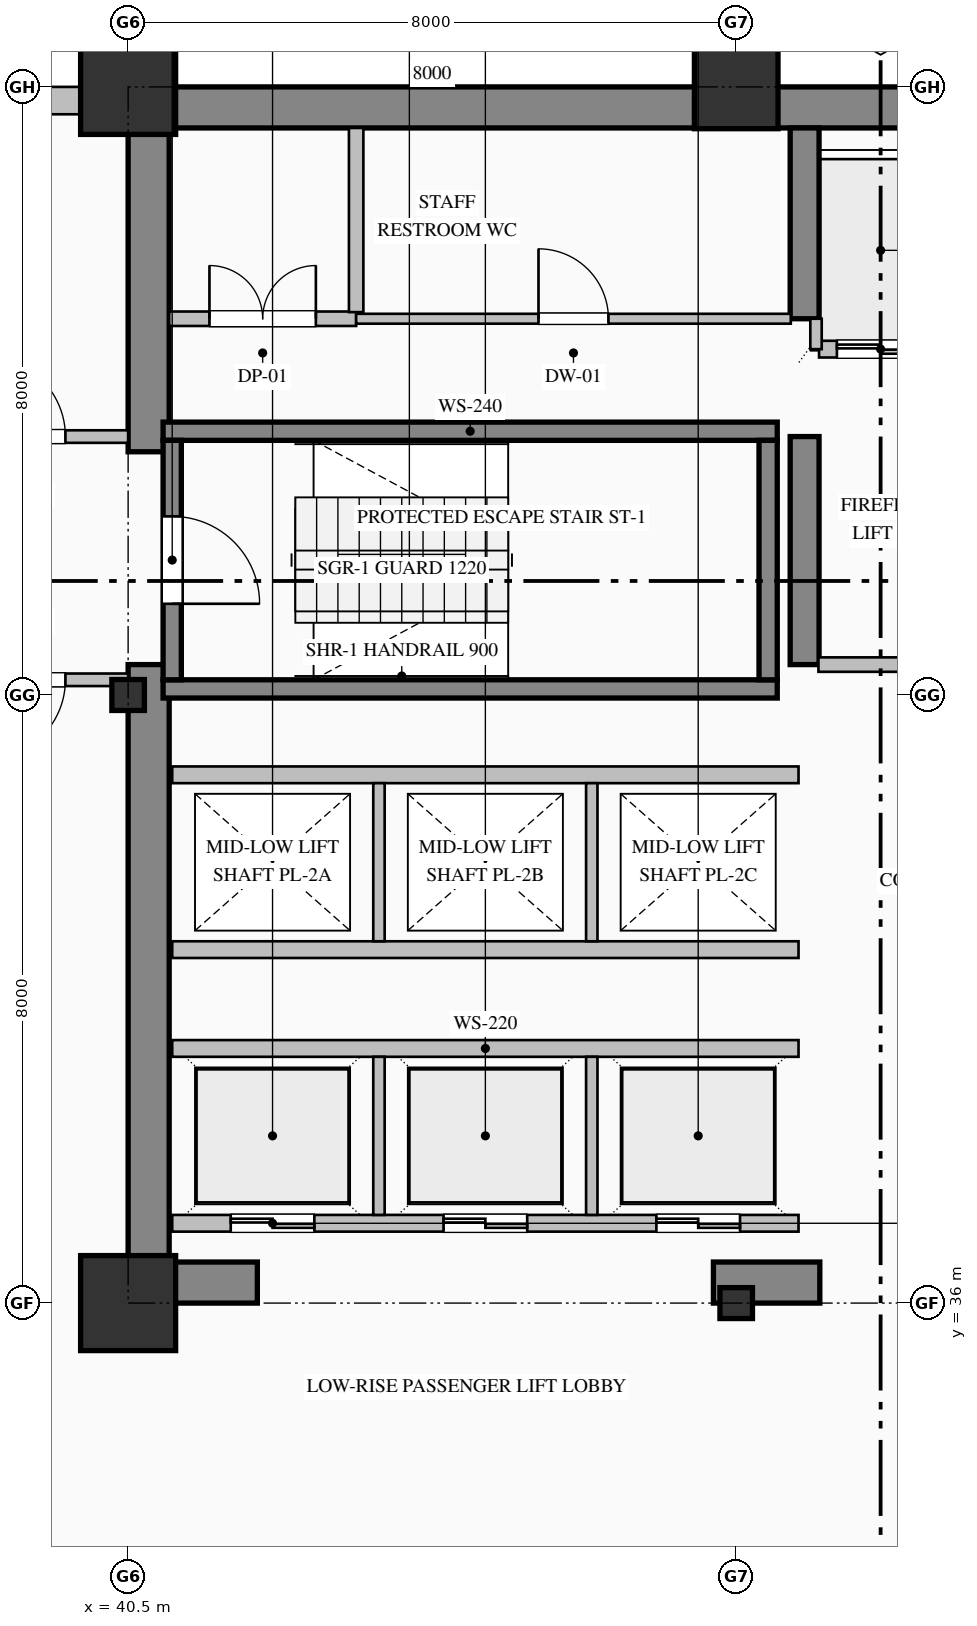
"""IFC4 building model, lengths in metres.
Left out: names, types, materials, properties, quantities, classifications, styles, units other than length and angle.
Written with IfcOpenShell. Run it as: python <this file> out.ifc"""

import sys

from ifc_helpers import new_model, si_unit, direction, frame, frame_2d, origin, origin_2d, place, context, subcontext, project, spatial, rectangle, hollow_rectangle, i_section, extrude, element, fill, save


model = new_model("IFC4")
c1 = context("Model", 3, precision=1e-05, world=origin(), true_north=direction((0.0, 1.0)))
c2 = subcontext(c1, "Body", "Model", "MODEL_VIEW")
j1 = project(units=[si_unit("LENGTHUNIT", "METRE"), si_unit("PLANEANGLEUNIT", "RADIAN")], contexts=[c1])
p1 = place(None, origin())
s1 = spatial("IfcSite", under=j1, at=p1, CompositionType="ELEMENT")
p2 = place(p1, origin())
s2 = spatial("IfcBuilding", under=s1, at=p2, CompositionType="ELEMENT")
p3 = place(p2, frame((0.0, 0.0, 80.2)))
s3 = spatial("IfcBuildingStorey", under=s2, at=p3, CompositionType="ELEMENT", Elevation=80.2)
p4 = place(p3, frame((40.5, 51.73, 0.0), z_axis=(0.0, 0.0, 1.0), x_axis=(1.0, 0.0, 0.0)))
e1 = element("IfcWall", 1, at=p4, inside=s3, PredefinedType="SHEAR", context=c2, shape_type="SweptSolid", body=[
    extrude(rectangle(XDim=23.5, YDim=0.54, at=frame_2d((11.75, 0.0))), origin(), (0.0, 0.0, 1.0), 3.75),
])
p5 = place(p3, frame((40.77, 36.54, 0.0), z_axis=(0.0, 0.0, 1.0), x_axis=(0.0, 1.0, 0.0)))
e2 = element("IfcWall", 2, at=p5, inside=s3, PredefinedType="SHEAR", context=c2, shape_type="SweptSolid", body=[
    extrude(rectangle(XDim=7.86, YDim=0.54, at=frame_2d((3.93, 0.0))), origin(), (0.0, 0.0, 1.0), 3.75),
])
p6 = place(p3, frame((40.77, 47.2, 0.0), z_axis=(0.0, 0.0, 1.0), x_axis=(0.0, 1.0, 0.0)))
e3 = element("IfcWall", 3, at=p6, inside=s3, PredefinedType="SHEAR", context=c2, shape_type="SweptSolid", body=[
    extrude(rectangle(XDim=4.26, YDim=0.54, at=frame_2d((2.13, 0.0))), origin(), (0.0, 0.0, 1.0), 3.75),
])
p7 = place(p3, frame((40.5, 36.27, 0.0), z_axis=(0.0, 0.0, 1.0), x_axis=(1.0, 0.0, 0.0)))
e4 = element("IfcWall", 4, at=p7, inside=s3, PredefinedType="SHEAR", context=c2, shape_type="SweptSolid", body=[
    extrude(rectangle(XDim=1.7, YDim=0.54, at=frame_2d((0.85, 0.0))), origin(), (0.0, 0.0, 1.0), 3.75),
])
p8 = place(p3, frame((48.2, 36.27, 0.0), z_axis=(0.0, 0.0, 1.0), x_axis=(1.0, 0.0, 0.0)))
e5 = element("IfcWall", 5, at=p8, inside=s3, PredefinedType="SHEAR", context=c2, shape_type="SweptSolid", body=[
    extrude(rectangle(XDim=1.4, YDim=0.54, at=frame_2d((0.7, 0.0))), origin(), (0.0, 0.0, 1.0), 3.75),
])
p9 = place(p3, frame((49.4, 44.4, 0.0), z_axis=(0.0, 0.0, 1.0), x_axis=(0.0, 1.0, 0.0)))
e6 = element("IfcWall", 6, at=p9, inside=s3, PredefinedType="SHEAR", context=c2, shape_type="SweptSolid", body=[
    extrude(rectangle(XDim=3.0, YDim=0.38, at=frame_2d((1.5, 0.0))), origin(), (0.0, 0.0, 1.0), 3.75),
])
p10 = place(p3, frame((49.4, 48.95, 0.0), z_axis=(0.0, 0.0, 1.0), x_axis=(0.0, 1.0, 0.0)))
e7 = element("IfcWall", 7, at=p10, inside=s3, PredefinedType="SHEAR", context=c2, shape_type="SweptSolid", body=[
    extrude(rectangle(XDim=2.51, YDim=0.38, at=frame_2d((1.255, 0.0))), origin(), (0.0, 0.0, 1.0), 3.75),
])
p11 = place(p3, frame((40.5, 36.0, 0.0), z_axis=(0.0, 0.0, 1.0), x_axis=(1.0, 0.0, 0.0)))
e8 = element("IfcColumn", 8, at=p11, inside=s3, PredefinedType="COLUMN", context=c2, shape_type="SweptSolid", body=[
    extrude(hollow_rectangle(XDim=1.25, YDim=1.25, WallThickness=0.045, at=origin_2d()), origin(), (0.0, 0.0, 1.0), 4.0),
])
p12 = place(p3, frame((40.5, 44.0, 0.0), z_axis=(0.0, 0.0, 1.0), x_axis=(1.0, 0.0, 0.0)))
e9 = element("IfcColumn", 9, at=p12, inside=s3, PredefinedType="COLUMN", context=c2, shape_type="SweptSolid", body=[
    extrude(i_section(OverallWidth=0.407, OverallDepth=0.428, WebThickness=0.02, FlangeThickness=0.035, FilletRadius=0.022, at=origin_2d()), origin(), (0.0, 0.0, 1.0), 4.0),
])
p13 = place(p3, frame((40.5, 52.0, 0.0), z_axis=(0.0, 0.0, 1.0), x_axis=(1.0, 0.0, 0.0)))
e10 = element("IfcColumn", 10, at=p13, inside=s3, PredefinedType="COLUMN", context=c2, shape_type="SweptSolid", body=[
    extrude(hollow_rectangle(XDim=1.25, YDim=1.25, WallThickness=0.045, at=origin_2d()), origin(), (0.0, 0.0, 1.0), 4.0),
])
p14 = place(p3, frame((48.5, 36.0, 0.0), z_axis=(0.0, 0.0, 1.0), x_axis=(1.0, 0.0, 0.0)))
e11 = element("IfcColumn", 11, at=p14, inside=s3, PredefinedType="COLUMN", context=c2, shape_type="SweptSolid", body=[
    extrude(i_section(OverallWidth=0.407, OverallDepth=0.428, WebThickness=0.02, FlangeThickness=0.035, FilletRadius=0.022, at=origin_2d()), origin(), (0.0, 0.0, 1.0), 4.0),
])
p15 = place(p3, frame((48.5, 52.0, 0.0), z_axis=(0.0, 0.0, 1.0), x_axis=(1.0, 0.0, 0.0)))
e12 = element("IfcColumn", 12, at=p15, inside=s3, PredefinedType="COLUMN", context=c2, shape_type="SweptSolid", body=[
    extrude(hollow_rectangle(XDim=1.1, YDim=1.1, WallThickness=0.04, at=origin_2d()), origin(), (0.0, 0.0, 1.0), 4.0),
])
p16 = place(p3, frame((4.0, 51.82, 0.0), z_axis=(0.0, 0.0, 1.0), x_axis=(1.0, 0.0, 0.0)))
e13 = element("IfcWall", 13, at=p16, inside=s3, PredefinedType="SOLIDWALL", context=c2, shape_type="SweptSolid", body=[
    extrude(rectangle(XDim=36.52, YDim=0.36, at=frame_2d((18.26, 0.0))), origin(), (0.0, 0.0, 1.0), 3.25),
])
p17 = place(p16, frame((6.15, 0.0, 0.85)))
e14 = element("IfcOpeningElement", 14, at=p17, cuts=e13, PredefinedType="OPENING", context=c2, shape_type="SweptSolid", body=[
    extrude(rectangle(XDim=2.1, YDim=2.05, at=frame_2d((1.05, 1.025))), frame((0.0, 0.19, 0.0), z_axis=(0.0, -1.0, 0.0), x_axis=(1.0, 0.0, 0.0)), (0.0, 0.0, 1.0), 0.38),
])
p18 = place(p16, frame((13.5, 0.0, 0.85)))
e15 = element("IfcOpeningElement", 15, at=p18, cuts=e13, PredefinedType="OPENING", context=c2, shape_type="SweptSolid", body=[
    extrude(rectangle(XDim=1.8, YDim=2.05, at=frame_2d((0.9, 1.025))), frame((0.0, 0.19, 0.0), z_axis=(0.0, -1.0, 0.0), x_axis=(1.0, 0.0, 0.0)), (0.0, 0.0, 1.0), 0.38),
])
p19 = place(p16, frame((16.95, 0.0, 0.85)))
e16 = element("IfcOpeningElement", 16, at=p19, cuts=e13, PredefinedType="OPENING", context=c2, shape_type="SweptSolid", body=[
    extrude(rectangle(XDim=2.1, YDim=2.05, at=frame_2d((1.05, 1.025))), frame((0.0, 0.19, 0.0), z_axis=(0.0, -1.0, 0.0), x_axis=(1.0, 0.0, 0.0)), (0.0, 0.0, 1.0), 0.38),
])
p20 = place(p16, frame((24.3, 0.0, 0.85)))
e17 = element("IfcOpeningElement", 17, at=p20, cuts=e13, PredefinedType="OPENING", context=c2, shape_type="SweptSolid", body=[
    extrude(rectangle(XDim=1.8, YDim=2.05, at=frame_2d((0.9, 1.025))), frame((0.0, 0.19, 0.0), z_axis=(0.0, -1.0, 0.0), x_axis=(1.0, 0.0, 0.0)), (0.0, 0.0, 1.0), 0.38),
])
for number, where, z_axis, x_axis in (
    (18, (40.96, 47.47, 0.0), (0.0, 0.0, 1.0), (1.0, 0.0, 0.0)),
    (19, (49.04, 44.08, 0.0), (0.0, 0.0, 1.0), (-1.0, 0.0, 0.0)),
):
    element("IfcWall", number, at=place(p3, frame(where, z_axis=z_axis, x_axis=x_axis)), inside=s3, PredefinedType="SOLIDWALL", context=c2, shape_type="SweptSolid", body=[
        extrude(rectangle(XDim=8.08, YDim=0.24, at=frame_2d((4.04, 0.0))), origin(), (0.0, 0.0, 1.0), 4.0),
    ])
p21 = place(p3, frame((41.08, 47.35, 0.0), z_axis=(0.0, 0.0, 1.0), x_axis=(0.0, -1.0, 0.0)))
e20 = element("IfcWall", 20, at=p21, inside=s3, PredefinedType="SOLIDWALL", context=c2, shape_type="SweptSolid", body=[
    extrude(rectangle(XDim=3.15, YDim=0.24, at=frame_2d((1.575, 0.0))), origin(), (0.0, 0.0, 1.0), 4.0),
])
p22 = place(p21, frame((1.0, 0.0, 0.0)))
e21 = element("IfcOpeningElement", 21, at=p22, cuts=e20, PredefinedType="OPENING", context=c2, shape_type="SweptSolid", body=[
    extrude(rectangle(XDim=1.15, YDim=2.2, at=frame_2d((0.575, 1.1))), frame((0.0, 0.13, 0.0), z_axis=(0.0, -1.0, 0.0), x_axis=(1.0, 0.0, 0.0)), (0.0, 0.0, 1.0), 0.26),
])
p23 = place(p3, frame((48.92, 44.2, 0.0), z_axis=(0.0, 0.0, 1.0), x_axis=(0.0, 1.0, 0.0)))
e22 = element("IfcWall", 22, at=p23, inside=s3, PredefinedType="SOLIDWALL", context=c2, shape_type="SweptSolid", body=[
    extrude(rectangle(XDim=3.15, YDim=0.24, at=frame_2d((1.575, 0.0))), origin(), (0.0, 0.0, 1.0), 4.0),
])
p24 = place(p3, frame((54.71, 48.55, 0.0), z_axis=(0.0, 0.0, 1.0), x_axis=(-1.0, 0.0, 0.0)))
e23 = element("IfcWall", 23, at=p24, inside=s3, PredefinedType="PARTITIONING", context=c2, shape_type="SweptSolid", body=[
    extrude(rectangle(XDim=5.12, YDim=0.22, at=frame_2d((2.56, 0.0))), origin(), (0.0, 0.0, 1.0), 3.75),
])
p25 = place(p24, frame((3.735, 0.0, 0.0)))
e24 = element("IfcOpeningElement", 24, at=p25, cuts=e23, PredefinedType="OPENING", context=c2, shape_type="SweptSolid", body=[
    extrude(rectangle(XDim=1.15, YDim=2.2, at=frame_2d((0.575, 1.1))), frame((0.0, 0.12, 0.0), z_axis=(0.0, -1.0, 0.0), x_axis=(1.0, 0.0, 0.0)), (0.0, 0.0, 1.0), 0.24),
])
p26 = place(p24, frame((0.935, 0.0, 0.0)))
e25 = element("IfcOpeningElement", 25, at=p26, cuts=e23, PredefinedType="OPENING", context=c2, shape_type="SweptSolid", body=[
    extrude(rectangle(XDim=1.15, YDim=2.2, at=frame_2d((0.575, 1.1))), frame((0.0, 0.12, 0.0), z_axis=(0.0, -1.0, 0.0), x_axis=(1.0, 0.0, 0.0)), (0.0, 0.0, 1.0), 0.24),
])
p27 = place(p3, frame((49.55, 48.55, 0.0), z_axis=(0.0, 0.0, 1.0), x_axis=(0.0, 1.0, 0.0)))
e26 = element("IfcWall", 26, at=p27, inside=s3, PredefinedType="PARTITIONING", context=c2, shape_type="SweptSolid", body=[
    extrude(rectangle(XDim=0.4, YDim=0.15, at=frame_2d((0.2, 0.0))), origin(), (0.0, 0.0, 1.0), 3.75),
])
p28 = place(p3, frame((49.32, 37.05, 0.0), z_axis=(0.0, 0.0, 1.0), x_axis=(-1.0, 0.0, 0.0)))
e27 = element("IfcWall", 27, at=p28, inside=s3, PredefinedType="PARTITIONING", context=c2, shape_type="SweptSolid", body=[
    extrude(rectangle(XDim=8.24, YDim=0.22, at=frame_2d((4.12, 0.0))), origin(), (0.0, 0.0, 1.0), 3.75),
])
p29 = place(p28, frame((6.37, 0.0, 0.0)))
e28 = element("IfcOpeningElement", 28, at=p29, cuts=e27, PredefinedType="OPENING", context=c2, shape_type="SweptSolid", body=[
    extrude(rectangle(XDim=1.1, YDim=2.2, at=frame_2d((0.55, 1.1))), frame((0.0, 0.12, 0.0), z_axis=(0.0, -1.0, 0.0), x_axis=(1.0, 0.0, 0.0)), (0.0, 0.0, 1.0), 0.24),
])
p30 = place(p28, frame((3.57, 0.0, 0.0)))
e29 = element("IfcOpeningElement", 29, at=p30, cuts=e27, PredefinedType="OPENING", context=c2, shape_type="SweptSolid", body=[
    extrude(rectangle(XDim=1.1, YDim=2.2, at=frame_2d((0.55, 1.1))), frame((0.0, 0.12, 0.0), z_axis=(0.0, -1.0, 0.0), x_axis=(1.0, 0.0, 0.0)), (0.0, 0.0, 1.0), 0.24),
])
p31 = place(p28, frame((0.77, 0.0, 0.0)))
e30 = element("IfcOpeningElement", 30, at=p31, cuts=e27, PredefinedType="OPENING", context=c2, shape_type="SweptSolid", body=[
    extrude(rectangle(XDim=1.1, YDim=2.2, at=frame_2d((0.55, 1.1))), frame((0.0, 0.12, 0.0), z_axis=(0.0, -1.0, 0.0), x_axis=(1.0, 0.0, 0.0)), (0.0, 0.0, 1.0), 0.24),
])
p32 = place(p3, frame((41.08, 39.35, 0.0), z_axis=(0.0, 0.0, 1.0), x_axis=(1.0, 0.0, 0.0)))
e31 = element("IfcWall", 31, at=p32, inside=s3, PredefinedType="PARTITIONING", context=c2, shape_type="SweptSolid", body=[
    extrude(rectangle(XDim=8.24, YDim=0.22, at=frame_2d((4.12, 0.0))), origin(), (0.0, 0.0, 1.0), 3.75),
])
for number, where, z_axis, x_axis in (
    (32, (43.8, 37.16, 0.0), (0.0, 0.0, 1.0), (0.0, 1.0, 0.0)),
    (33, (46.6, 37.16, 0.0), (0.0, 0.0, 1.0), (0.0, 1.0, 0.0)),
):
    element("IfcWall", number, at=place(p3, frame(where, z_axis=z_axis, x_axis=x_axis)), inside=s3, PredefinedType="PARTITIONING", context=c2, shape_type="SweptSolid", body=[
        extrude(rectangle(XDim=2.08, YDim=0.15, at=frame_2d((1.04, 0.0))), origin(), (0.0, 0.0, 1.0), 3.75),
    ])
for number, where, z_axis, x_axis in (
    (34, (49.32, 40.65, 0.0), (0.0, 0.0, 1.0), (-1.0, 0.0, 0.0)),
    (35, (41.08, 42.95, 0.0), (0.0, 0.0, 1.0), (1.0, 0.0, 0.0)),
):
    element("IfcWall", number, at=place(p3, frame(where, z_axis=z_axis, x_axis=x_axis)), inside=s3, PredefinedType="PARTITIONING", context=c2, shape_type="SweptSolid", body=[
        extrude(rectangle(XDim=8.24, YDim=0.22, at=frame_2d((4.12, 0.0))), origin(), (0.0, 0.0, 1.0), 3.75),
    ])
for number, where, z_axis, x_axis in (
    (36, (43.8, 40.76, 0.0), (0.0, 0.0, 1.0), (0.0, 1.0, 0.0)),
    (37, (46.6, 40.76, 0.0), (0.0, 0.0, 1.0), (0.0, 1.0, 0.0)),
):
    element("IfcWall", number, at=place(p3, frame(where, z_axis=z_axis, x_axis=x_axis)), inside=s3, PredefinedType="PARTITIONING", context=c2, shape_type="SweptSolid", body=[
        extrude(rectangle(XDim=2.08, YDim=0.15, at=frame_2d((1.04, 0.0))), origin(), (0.0, 0.0, 1.0), 3.75),
    ])
p33 = place(p3, frame((37.8, 47.4, 0.0), z_axis=(0.0, 0.0, 1.0), x_axis=(1.0, 0.0, 0.0)))
e38 = element("IfcWall", 38, at=p33, inside=s3, PredefinedType="PARTITIONING", context=c2, shape_type="SweptSolid", body=[
    extrude(rectangle(XDim=2.7, YDim=0.165, at=frame_2d((1.35, 0.0))), origin(), (0.0, 0.0, 1.0), 3.75),
])
p34 = place(p33, frame((0.825, 0.0, 0.0)))
e39 = element("IfcOpeningElement", 39, at=p34, cuts=e38, PredefinedType="OPENING", context=c2, shape_type="SweptSolid", body=[
    extrude(rectangle(XDim=1.05, YDim=2.15, at=frame_2d((0.525, 1.075))), frame((0.0, 0.093, 0.0), z_axis=(0.0, -1.0, 0.0), x_axis=(1.0, 0.0, 0.0)), (0.0, 0.0, 1.0), 0.185),
])
p35 = place(p3, frame((40.5, 44.2, 0.0), z_axis=(0.0, 0.0, 1.0), x_axis=(-1.0, 0.0, 0.0)))
e40 = element("IfcWall", 40, at=p35, inside=s3, PredefinedType="PARTITIONING", context=c2, shape_type="SweptSolid", body=[
    extrude(rectangle(XDim=2.7, YDim=0.165, at=frame_2d((1.35, 0.0))), origin(), (0.0, 0.0, 1.0), 3.75),
])
p36 = place(p35, frame((0.825, 0.0, 0.0)))
e41 = element("IfcOpeningElement", 41, at=p36, cuts=e40, PredefinedType="OPENING", context=c2, shape_type="SweptSolid", body=[
    extrude(rectangle(XDim=1.05, YDim=2.15, at=frame_2d((0.525, 1.075))), frame((0.0, 0.093, 0.0), z_axis=(0.0, -1.0, 0.0), x_axis=(1.0, 0.0, 0.0)), (0.0, 0.0, 1.0), 0.185),
])
p37 = place(p3, frame((41.04, 48.95, 0.0), z_axis=(0.0, 0.0, 1.0), x_axis=(1.0, 0.0, 0.0)))
e42 = element("IfcWall", 42, at=p37, inside=s3, PredefinedType="PARTITIONING", context=c2, shape_type="SweptSolid", body=[
    extrude(rectangle(XDim=2.46, YDim=0.19, at=frame_2d((1.23, 0.0))), origin(), (0.0, 0.0, 1.0), 3.75),
])
p38 = place(p37, frame((0.53, 0.0, 0.0)))
e43 = element("IfcOpeningElement", 43, at=p38, cuts=e42, PredefinedType="OPENING", context=c2, shape_type="SweptSolid", body=[
    extrude(rectangle(XDim=1.4, YDim=2.25, at=frame_2d((0.7, 1.125))), frame((0.0, 0.105, 0.0), z_axis=(0.0, -1.0, 0.0), x_axis=(1.0, 0.0, 0.0)), (0.0, 0.0, 1.0), 0.21),
])
p39 = place(p3, frame((43.5, 48.95, 0.0), z_axis=(0.0, 0.0, 1.0), x_axis=(1.0, 0.0, 0.0)))
e44 = element("IfcWall", 44, at=p39, inside=s3, PredefinedType="PARTITIONING", context=c2, shape_type="SweptSolid", body=[
    extrude(rectangle(XDim=5.718, YDim=0.13, at=frame_2d((2.859, 0.0))), origin(), (0.0, 0.0, 1.0), 3.75),
])
p40 = place(p39, frame((2.399, 0.0, 0.0)))
e45 = element("IfcOpeningElement", 45, at=p40, cuts=e44, PredefinedType="OPENING", context=c2, shape_type="SweptSolid", body=[
    extrude(rectangle(XDim=0.92, YDim=2.15, at=frame_2d((0.46, 1.075))), frame((0.0, 0.075, 0.0), z_axis=(0.0, -1.0, 0.0), x_axis=(1.0, 0.0, 0.0)), (0.0, 0.0, 1.0), 0.15),
])
p41 = place(p3, frame((54.718, 44.4, 0.0), z_axis=(0.0, 0.0, 1.0), x_axis=(-1.0, 0.0, 0.0)))
e46 = element("IfcWall", 46, at=p41, inside=s3, PredefinedType="PARTITIONING", context=c2, shape_type="SweptSolid", body=[
    extrude(rectangle(XDim=5.136, YDim=0.19, at=frame_2d((2.568, 0.0))), origin(), (0.0, 0.0, 1.0), 3.75),
])
p42 = place(p41, frame((2.043, 0.0, 0.0)))
e47 = element("IfcOpeningElement", 47, at=p42, cuts=e46, PredefinedType="OPENING", context=c2, shape_type="SweptSolid", body=[
    extrude(rectangle(XDim=1.05, YDim=2.15, at=frame_2d((0.525, 1.075))), frame((0.0, 0.105, 0.0), z_axis=(0.0, -1.0, 0.0), x_axis=(1.0, 0.0, 0.0)), (0.0, 0.0, 1.0), 0.21),
])
p43 = place(p3, frame((43.5, 51.46, 0.0), z_axis=(0.0, 0.0, 1.0), x_axis=(0.0, -1.0, 0.0)))
e48 = element("IfcWall", 48, at=p43, inside=s3, PredefinedType="PARTITIONING", context=c2, shape_type="SweptSolid", body=[
    extrude(rectangle(XDim=2.423, YDim=0.19, at=frame_2d((1.211, 0.0))), origin(), (0.0, 0.0, 1.0), 3.75),
])
p44 = place(p22, origin())
e49 = element("IfcDoor", 49, at=p44, inside=s3, OperationType="SINGLE_SWING_RIGHT", PredefinedType="DOOR", context=c2, shape_type="SweptSolid", body=[
    extrude(rectangle(XDim=1.15, YDim=2.2, at=frame_2d((0.575, 1.1))), frame((0.0, 0.025, 0.0), z_axis=(0.0, -1.0, 0.0), x_axis=(1.0, 0.0, 0.0)), (0.0, 0.0, 1.0), 0.05),
])
fill(e21, e49)
p45 = place(p25, origin())
e50 = element("IfcDoor", 50, at=p45, inside=s3, OperationType="DOUBLE_DOOR_SLIDING", PredefinedType="DOOR", context=c2, shape_type="SweptSolid", body=[
    extrude(rectangle(XDim=1.15, YDim=2.2, at=frame_2d((0.575, 1.1))), frame((0.0, 0.025, 0.0), z_axis=(0.0, -1.0, 0.0), x_axis=(1.0, 0.0, 0.0)), (0.0, 0.0, 1.0), 0.05),
])
fill(e24, e50)
p46 = place(p29, origin())
e51 = element("IfcDoor", 51, at=p46, inside=s3, OperationType="DOUBLE_DOOR_SLIDING", PredefinedType="DOOR", context=c2, shape_type="SweptSolid", body=[
    extrude(rectangle(XDim=1.1, YDim=2.2, at=frame_2d((0.55, 1.1))), frame((0.0, 0.025, 0.0), z_axis=(0.0, -1.0, 0.0), x_axis=(1.0, 0.0, 0.0)), (0.0, 0.0, 1.0), 0.05),
])
fill(e28, e51)
p47 = place(p30, origin())
e52 = element("IfcDoor", 52, at=p47, inside=s3, OperationType="DOUBLE_DOOR_SLIDING", PredefinedType="DOOR", context=c2, shape_type="SweptSolid", body=[
    extrude(rectangle(XDim=1.1, YDim=2.2, at=frame_2d((0.55, 1.1))), frame((0.0, 0.025, 0.0), z_axis=(0.0, -1.0, 0.0), x_axis=(1.0, 0.0, 0.0)), (0.0, 0.0, 1.0), 0.05),
])
fill(e29, e52)
p48 = place(p31, origin())
e53 = element("IfcDoor", 53, at=p48, inside=s3, OperationType="DOUBLE_DOOR_SLIDING", PredefinedType="DOOR", context=c2, shape_type="SweptSolid", body=[
    extrude(rectangle(XDim=1.1, YDim=2.2, at=frame_2d((0.55, 1.1))), frame((0.0, 0.025, 0.0), z_axis=(0.0, -1.0, 0.0), x_axis=(1.0, 0.0, 0.0)), (0.0, 0.0, 1.0), 0.05),
])
fill(e30, e53)
p49 = place(p34, origin())
e54 = element("IfcDoor", 54, at=p49, inside=s3, OperationType="SINGLE_SWING_LEFT", PredefinedType="DOOR", context=c2, shape_type="SweptSolid", body=[
    extrude(rectangle(XDim=1.05, YDim=2.15, at=frame_2d((0.525, 1.075))), frame((0.0, 0.025, 0.0), z_axis=(0.0, -1.0, 0.0), x_axis=(1.0, 0.0, 0.0)), (0.0, 0.0, 1.0), 0.05),
])
fill(e39, e54)
p50 = place(p36, origin())
e55 = element("IfcDoor", 55, at=p50, inside=s3, OperationType="SINGLE_SWING_RIGHT", PredefinedType="DOOR", context=c2, shape_type="SweptSolid", body=[
    extrude(rectangle(XDim=1.05, YDim=2.15, at=frame_2d((0.525, 1.075))), frame((0.0, 0.025, 0.0), z_axis=(0.0, -1.0, 0.0), x_axis=(1.0, 0.0, 0.0)), (0.0, 0.0, 1.0), 0.05),
])
fill(e41, e55)
p51 = place(p38, origin())
e56 = element("IfcDoor", 56, at=p51, inside=s3, OperationType="DOUBLE_DOOR_SINGLE_SWING", PredefinedType="DOOR", context=c2, shape_type="SweptSolid", body=[
    extrude(rectangle(XDim=1.4, YDim=2.25, at=frame_2d((0.7, 1.125))), frame((0.0, 0.025, 0.0), z_axis=(0.0, -1.0, 0.0), x_axis=(1.0, 0.0, 0.0)), (0.0, 0.0, 1.0), 0.05),
])
fill(e43, e56)
p52 = place(p40, origin())
e57 = element("IfcDoor", 57, at=p52, inside=s3, OperationType="SINGLE_SWING_LEFT", PredefinedType="DOOR", context=c2, shape_type="SweptSolid", body=[
    extrude(rectangle(XDim=0.92, YDim=2.15, at=frame_2d((0.46, 1.075))), frame((0.0, 0.025, 0.0), z_axis=(0.0, -1.0, 0.0), x_axis=(1.0, 0.0, 0.0)), (0.0, 0.0, 1.0), 0.05),
])
fill(e45, e57)
save(model, sys.argv[1])
